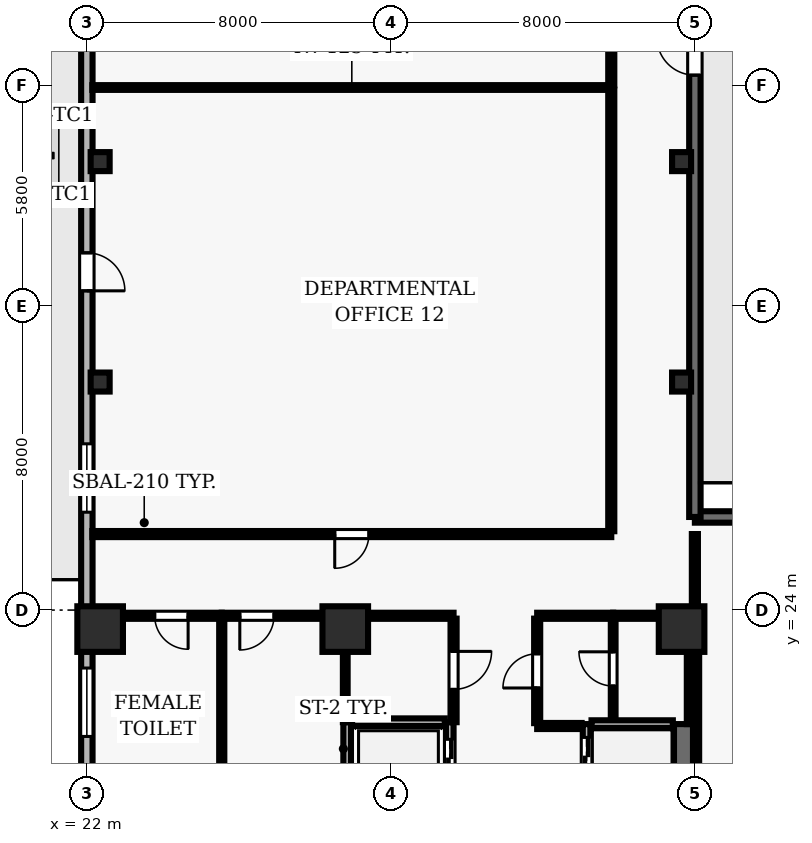
"""IFC4 building model, lengths in metres.
Left out: names, types, materials, properties, quantities, classifications, styles, units other than length and angle.
Written with IfcOpenShell. Run it as: python <this file> out.ifc"""

import sys

from ifc_helpers import new_model, si_unit, direction, frame, frame_2d, origin, origin_2d, place, context, subcontext, project, spatial, rectangle, hollow_rectangle, extrude, element, fill, save


model = new_model("IFC4")
c1 = context("Model", 3, precision=1e-05, world=origin(), true_north=direction((0.0, 1.0)))
c2 = subcontext(c1, "Body", "Model", "MODEL_VIEW")
j1 = project(units=[si_unit("LENGTHUNIT", "METRE"), si_unit("PLANEANGLEUNIT", "RADIAN")], contexts=[c1])
p1 = place(None, origin())
s1 = spatial("IfcSite", under=j1, at=p1, CompositionType="ELEMENT")
p2 = place(p1, origin())
s2 = spatial("IfcBuilding", under=s1, at=p2, CompositionType="ELEMENT")
p3 = place(p2, frame((0.0, 0.0, 138.5)))
s3 = spatial("IfcBuildingStorey", under=s2, at=p3, CompositionType="ELEMENT", Elevation=138.5)
for number, where, z_axis, x_axis in (
    (1, (22.35, 23.5, 0.0), (0.0, 0.0, 1.0), (1.0, 0.0, 0.0)),
    (2, (28.8, 23.5, 0.0), (0.0, 0.0, 1.0), (1.0, 0.0, 0.0)),
    (3, (37.65, 23.5, 0.0), (0.0, 0.0, 1.0), (1.0, 0.0, 0.0)),
):
    element("IfcColumn", number, at=place(p3, frame(where, z_axis=z_axis, x_axis=x_axis)), inside=s3, PredefinedType="COLUMN", context=c2, shape_type="SweptSolid", body=[
        extrude(rectangle(XDim=1.2, YDim=1.2, at=origin_2d()), origin(), (0.0, 0.0, 1.0), 3.9),
    ])
for number, where, z_axis, x_axis in (
    (4, (22.35, 30.0, 0.0), (0.0, 0.0, 1.0), (1.0, 0.0, 0.0)),
    (5, (37.65, 30.0, 0.0), (0.0, 0.0, 1.0), (1.0, 0.0, 0.0)),
    (6, (22.35, 35.8, 0.0), (0.0, 0.0, 1.0), (1.0, 0.0, 0.0)),
    (7, (37.65, 35.8, 0.0), (0.0, 0.0, 1.0), (1.0, 0.0, 0.0)),
):
    element("IfcColumn", number, at=place(p3, frame(where, z_axis=z_axis, x_axis=x_axis)), inside=s3, PredefinedType="COLUMN", context=c2, shape_type="SweptSolid", body=[
        extrude(hollow_rectangle(XDim=0.5, YDim=0.5, WallThickness=0.025, at=origin_2d()), origin(), (0.0, 0.0, 1.0), 3.9),
    ])
p4 = place(p3, frame((45.499, 26.45, 0.0), z_axis=(0.0, 0.0, 1.0), x_axis=(-1.0, 0.0, 0.0)))
e8 = element("IfcWall", 8, at=p4, inside=s3, PredefinedType="SOLIDWALL", context=c2, shape_type="SweptSolid", body=[
    extrude(rectangle(XDim=7.499, YDim=0.3, at=frame_2d((3.75, 0.0))), origin(), (0.0, 0.0, 1.0), 3.69),
])
p5 = place(p4, frame((2.55, 0.0, 0.9)))
e9 = element("IfcOpeningElement", 9, at=p5, cuts=e8, PredefinedType="OPENING", context=c2, shape_type="SweptSolid", body=[
    extrude(rectangle(XDim=2.4, YDim=1.6, at=frame_2d((1.2, 0.8))), frame((0.0, 0.16, 0.0), z_axis=(0.0, -1.0, 0.0), x_axis=(1.0, 0.0, 0.0)), (0.0, 0.0, 1.0), 0.32),
])
p6 = place(p3, frame((38.0, 26.45, 0.0), z_axis=(0.0, 0.0, 1.0), x_axis=(0.0, 1.0, 0.0)))
e10 = element("IfcWall", 10, at=p6, inside=s3, PredefinedType="SOLIDWALL", context=c2, shape_type="SweptSolid", body=[
    extrude(rectangle(XDim=19.65, YDim=0.3, at=frame_2d((9.825, 0.0))), origin(), (0.0, 0.0, 1.0), 3.69),
])
p7 = place(p6, frame((11.625, 0.0, 0.0)))
e11 = element("IfcOpeningElement", 11, at=p7, cuts=e10, PredefinedType="OPENING", context=c2, shape_type="SweptSolid", body=[
    extrude(rectangle(XDim=1.0, YDim=2.2, at=frame_2d((0.5, 1.1))), frame((0.0, 0.16, 0.0), z_axis=(0.0, -1.0, 0.0), x_axis=(1.0, 0.0, 0.0)), (0.0, 0.0, 1.0), 0.32),
])
p8 = place(p6, frame((15.625, 0.0, 0.9)))
e12 = element("IfcOpeningElement", 12, at=p8, cuts=e10, PredefinedType="OPENING", context=c2, shape_type="SweptSolid", body=[
    extrude(rectangle(XDim=1.5, YDim=1.8, at=frame_2d((0.75, 0.9))), frame((0.0, 0.16, 0.0), z_axis=(0.0, -1.0, 0.0), x_axis=(1.0, 0.0, 0.0)), (0.0, 0.0, 1.0), 0.32),
])
p9 = place(p3, frame((22.0, 46.1, 0.0), z_axis=(0.0, 0.0, 1.0), x_axis=(0.0, -1.0, 0.0)))
e13 = element("IfcWall", 13, at=p9, inside=s3, PredefinedType="SOLIDWALL", context=c2, shape_type="SweptSolid", body=[
    extrude(rectangle(XDim=43.6, YDim=0.3, at=frame_2d((21.8, 0.0))), origin(), (0.0, 0.0, 1.0), 3.69),
])
p10 = place(p9, frame((12.7, 0.0, 0.0)))
e14 = element("IfcOpeningElement", 14, at=p10, cuts=e13, PredefinedType="OPENING", context=c2, shape_type="SweptSolid", body=[
    extrude(rectangle(XDim=1.0, YDim=2.2, at=frame_2d((0.5, 1.1))), frame((0.0, 0.16, 0.0), z_axis=(0.0, -1.0, 0.0), x_axis=(1.0, 0.0, 0.0)), (0.0, 0.0, 1.0), 0.32),
])
p11 = place(p9, frame((1.825, 0.0, 0.9)))
e15 = element("IfcOpeningElement", 15, at=p11, cuts=e13, PredefinedType="OPENING", context=c2, shape_type="SweptSolid", body=[
    extrude(rectangle(XDim=1.8, YDim=2.2, at=frame_2d((0.9, 1.1))), frame((0.0, 0.16, 0.0), z_axis=(0.0, -1.0, 0.0), x_axis=(1.0, 0.0, 0.0)), (0.0, 0.0, 1.0), 0.32),
])
p12 = place(p9, frame((17.725, 0.0, 0.9)))
e16 = element("IfcOpeningElement", 16, at=p12, cuts=e13, PredefinedType="OPENING", context=c2, shape_type="SweptSolid", body=[
    extrude(rectangle(XDim=1.8, YDim=2.2, at=frame_2d((0.9, 1.1))), frame((0.0, 0.16, 0.0), z_axis=(0.0, -1.0, 0.0), x_axis=(1.0, 0.0, 0.0)), (0.0, 0.0, 1.0), 0.32),
])
p13 = place(p9, frame((23.625, 0.0, 0.9)))
e17 = element("IfcOpeningElement", 17, at=p13, cuts=e13, PredefinedType="OPENING", context=c2, shape_type="SweptSolid", body=[
    extrude(rectangle(XDim=1.8, YDim=2.2, at=frame_2d((0.9, 1.1))), frame((0.0, 0.16, 0.0), z_axis=(0.0, -1.0, 0.0), x_axis=(1.0, 0.0, 0.0)), (0.0, 0.0, 1.0), 0.32),
])
p14 = place(p9, frame((28.625, 0.0, 0.9)))
e18 = element("IfcOpeningElement", 18, at=p14, cuts=e13, PredefinedType="OPENING", context=c2, shape_type="SweptSolid", body=[
    extrude(rectangle(XDim=1.8, YDim=2.2, at=frame_2d((0.9, 1.1))), frame((0.0, 0.16, 0.0), z_axis=(0.0, -1.0, 0.0), x_axis=(1.0, 0.0, 0.0)), (0.0, 0.0, 1.0), 0.32),
])
p15 = place(p9, frame((34.525, 0.0, 0.9)))
e19 = element("IfcOpeningElement", 19, at=p15, cuts=e13, PredefinedType="OPENING", context=c2, shape_type="SweptSolid", body=[
    extrude(rectangle(XDim=1.8, YDim=2.2, at=frame_2d((0.9, 1.1))), frame((0.0, 0.16, 0.0), z_axis=(0.0, -1.0, 0.0), x_axis=(1.0, 0.0, 0.0)), (0.0, 0.0, 1.0), 0.32),
])
p16 = place(p3, frame((35.15, 21.0, 0.0), z_axis=(0.0, 0.0, 1.0), x_axis=(0.0, -1.0, 0.0)))
e20 = element("IfcWall", 20, at=p16, inside=s3, PredefinedType="SOLIDWALL", context=c2, shape_type="SweptSolid", body=[
    extrude(rectangle(XDim=1.7, YDim=0.2, at=frame_2d((0.85, 0.0))), origin(), (0.0, 0.0, 1.0), 3.69),
])
p17 = place(p16, frame((0.35, 0.0, 0.0)))
e21 = element("IfcOpeningElement", 21, at=p17, cuts=e20, PredefinedType="OPENING", context=c2, shape_type="SweptSolid", body=[
    extrude(rectangle(XDim=1.0, YDim=2.1, at=frame_2d((0.5, 1.05))), frame((0.0, 0.11, 0.0), z_axis=(0.0, -1.0, 0.0), x_axis=(1.0, 0.0, 0.0)), (0.0, 0.0, 1.0), 0.22),
])
p18 = place(p3, frame((37.7, 19.3, 0.0), z_axis=(0.0, 0.0, 1.0), x_axis=(0.0, 1.0, 0.0)))
e22 = element("IfcWall", 22, at=p18, inside=s3, PredefinedType="SHEAR", context=c2, shape_type="SweptSolid", body=[
    extrude(rectangle(XDim=1.7, YDim=0.5, at=frame_2d((0.85, 0.0))), origin(), (0.0, 0.0, 1.0), 3.69),
])
p19 = place(p3, frame((37.42, 21.0, 0.0), z_axis=(0.0, 0.0, 1.0), x_axis=(-1.0, 0.0, 0.0)))
e23 = element("IfcWall", 23, at=p19, inside=s3, PredefinedType="SOLIDWALL", context=c2, shape_type="SweptSolid", body=[
    extrude(rectangle(XDim=2.14, YDim=0.2, at=frame_2d((1.07, 0.0))), origin(), (0.0, 0.0, 1.0), 3.69),
])
p20 = place(p3, frame((28.85, 21.05, 0.0), z_axis=(0.0, 0.0, 1.0), x_axis=(0.0, -1.0, 0.0)))
e24 = element("IfcWall", 24, at=p20, inside=s3, PredefinedType="SOLIDWALL", context=c2, shape_type="SweptSolid", body=[
    extrude(rectangle(XDim=1.9, YDim=0.2, at=frame_2d((0.95, 0.0))), origin(), (0.0, 0.0, 1.0), 3.69),
])
p21 = place(p3, frame((31.55, 19.15, 0.0), z_axis=(0.0, 0.0, 1.0), x_axis=(0.0, 1.0, 0.0)))
e25 = element("IfcWall", 25, at=p21, inside=s3, PredefinedType="SOLIDWALL", context=c2, shape_type="SweptSolid", body=[
    extrude(rectangle(XDim=1.9, YDim=0.2, at=frame_2d((0.95, 0.0))), origin(), (0.0, 0.0, 1.0), 3.69),
])
p22 = place(p21, frame((0.45, 0.0, 0.0)))
e26 = element("IfcOpeningElement", 26, at=p22, cuts=e25, PredefinedType="OPENING", context=c2, shape_type="SweptSolid", body=[
    extrude(rectangle(XDim=1.0, YDim=2.1, at=frame_2d((0.5, 1.05))), frame((0.0, 0.11, 0.0), z_axis=(0.0, -1.0, 0.0), x_axis=(1.0, 0.0, 0.0)), (0.0, 0.0, 1.0), 0.22),
])
p23 = place(p3, frame((31.42, 21.05, 0.0), z_axis=(0.0, 0.0, 1.0), x_axis=(-1.0, 0.0, 0.0)))
e27 = element("IfcWall", 27, at=p23, inside=s3, PredefinedType="SOLIDWALL", context=c2, shape_type="SweptSolid", body=[
    extrude(rectangle(XDim=2.44, YDim=0.2, at=frame_2d((1.22, 0.0))), origin(), (0.0, 0.0, 1.0), 3.69),
])
p24 = place(p3, frame((25.55, 23.85, 0.0), z_axis=(0.0, 0.0, 1.0), x_axis=(-1.0, 0.0, 0.0)))
e28 = element("IfcWall", 28, at=p24, inside=s3, PredefinedType="PARTITIONING", context=c2, shape_type="SweptSolid", body=[
    extrude(rectangle(XDim=3.35, YDim=0.16, at=frame_2d((1.675, 0.0))), origin(), (0.0, 0.0, 1.0), 3.073),
])
p25 = place(p24, frame((0.885, 0.0, 0.0)))
e29 = element("IfcOpeningElement", 29, at=p25, cuts=e28, PredefinedType="OPENING", context=c2, shape_type="SweptSolid", body=[
    extrude(rectangle(XDim=0.88, YDim=2.1, at=frame_2d((0.44, 1.05))), frame((0.0, 0.09, 0.0), z_axis=(0.0, -1.0, 0.0), x_axis=(1.0, 0.0, 0.0)), (0.0, 0.0, 1.0), 0.18),
])
p26 = place(p3, frame((28.8, 23.85, 0.0), z_axis=(0.0, 0.0, 1.0), x_axis=(-1.0, 0.0, 0.0)))
e30 = element("IfcWall", 30, at=p26, inside=s3, PredefinedType="PARTITIONING", context=c2, shape_type="SweptSolid", body=[
    extrude(rectangle(XDim=3.25, YDim=0.16, at=frame_2d((1.625, 0.0))), origin(), (0.0, 0.0, 1.0), 3.073),
])
p27 = place(p26, frame((1.875, 0.0, 0.0)))
e31 = element("IfcOpeningElement", 31, at=p27, cuts=e30, PredefinedType="OPENING", context=c2, shape_type="SweptSolid", body=[
    extrude(rectangle(XDim=0.9, YDim=2.1, at=frame_2d((0.45, 1.05))), frame((0.0, 0.09, 0.0), z_axis=(0.0, -1.0, 0.0), x_axis=(1.0, 0.0, 0.0)), (0.0, 0.0, 1.0), 0.18),
])
p28 = place(p3, frame((31.65, 23.85, 0.0), z_axis=(0.0, 0.0, 1.0), x_axis=(-1.0, 0.0, 0.0)))
e32 = element("IfcWall", 32, at=p28, inside=s3, PredefinedType="PARTITIONING", context=c2, shape_type="SweptSolid", body=[
    extrude(rectangle(XDim=2.85, YDim=0.16, at=frame_2d((1.425, 0.0))), origin(), (0.0, 0.0, 1.0), 3.073),
])
p29 = place(p3, frame((35.02, 20.95, 0.0), z_axis=(0.0, 0.0, 1.0), x_axis=(-1.0, 0.0, 0.0)))
e33 = element("IfcWall", 33, at=p29, inside=s3, PredefinedType="PARTITIONING", context=c2, shape_type="SweptSolid", body=[
    extrude(rectangle(XDim=1.17, YDim=0.16, at=frame_2d((0.585, 0.0))), origin(), (0.0, 0.0, 1.0), 3.69),
])
p30 = place(p3, frame((35.8, 26.0, 0.0), z_axis=(0.0, 0.0, 1.0), x_axis=(-1.0, 0.0, 0.0)))
e34 = element("IfcWall", 34, at=p30, inside=s3, PredefinedType="PARTITIONING", context=c2, shape_type="SweptSolid", body=[
    extrude(rectangle(XDim=13.655, YDim=0.16, at=frame_2d((6.828, 0.0))), origin(), (0.0, 0.0, 1.0), 3.69),
])
p31 = place(p30, frame((6.377, 0.0, 0.0)))
e35 = element("IfcOpeningElement", 35, at=p31, cuts=e34, PredefinedType="OPENING", context=c2, shape_type="SweptSolid", body=[
    extrude(rectangle(XDim=0.9, YDim=2.1, at=frame_2d((0.45, 1.05))), frame((0.0, 0.09, 0.0), z_axis=(0.0, -1.0, 0.0), x_axis=(1.0, 0.0, 0.0)), (0.0, 0.0, 1.0), 0.18),
])
p32 = place(p3, frame((35.8, 37.75, 0.0), z_axis=(0.0, 0.0, 1.0), x_axis=(-1.0, 0.0, 0.0)))
e36 = element("IfcWall", 36, at=p32, inside=s3, PredefinedType="PARTITIONING", context=c2, shape_type="SweptSolid", body=[
    extrude(rectangle(XDim=13.655, YDim=0.125, at=frame_2d((6.828, 0.0))), origin(), (0.0, 0.0, 1.0), 3.69),
])
for number, where, z_axis, x_axis in (
    (37, (35.85, 23.85, 0.0), (0.0, 0.0, 1.0), (-1.0, 0.0, 0.0)),
    (38, (37.85, 23.85, 0.0), (0.0, 0.0, 1.0), (-1.0, 0.0, 0.0)),
):
    element("IfcWall", number, at=place(p3, frame(where, z_axis=z_axis, x_axis=x_axis)), inside=s3, PredefinedType="PARTITIONING", context=c2, shape_type="SweptSolid", body=[
        extrude(rectangle(XDim=2.0, YDim=0.16, at=frame_2d((1.0, 0.0))), origin(), (0.0, 0.0, 1.0), 3.073),
    ])
p33 = place(p3, frame((25.55, 19.16, 0.0), z_axis=(0.0, 0.0, 1.0), x_axis=(0.0, 1.0, 0.0)))
e39 = element("IfcWall", 39, at=p33, inside=s3, PredefinedType="PARTITIONING", context=c2, shape_type="SweptSolid", body=[
    extrude(rectangle(XDim=4.615, YDim=0.135, at=frame_2d((2.308, 0.0))), origin(), (0.0, 0.0, 1.0), 3.69),
])
p34 = place(p3, frame((28.8, 23.775, 0.0), z_axis=(0.0, 0.0, 1.0), x_axis=(0.0, -1.0, 0.0)))
e40 = element("IfcWall", 40, at=p34, inside=s3, PredefinedType="PARTITIONING", context=c2, shape_type="SweptSolid", body=[
    extrude(rectangle(XDim=2.725, YDim=0.125, at=frame_2d((1.362, 0.0))), origin(), (0.0, 0.0, 1.0), 3.69),
])
p35 = place(p3, frame((31.65, 23.775, 0.0), z_axis=(0.0, 0.0, 1.0), x_axis=(0.0, -1.0, 0.0)))
e41 = element("IfcWall", 41, at=p35, inside=s3, PredefinedType="PARTITIONING", context=c2, shape_type="SweptSolid", body=[
    extrude(rectangle(XDim=2.725, YDim=0.16, at=frame_2d((1.362, 0.0))), origin(), (0.0, 0.0, 1.0), 3.69),
])
p36 = place(p35, frame((0.862, 0.0, 0.0)))
e42 = element("IfcOpeningElement", 42, at=p36, cuts=e41, PredefinedType="OPENING", context=c2, shape_type="SweptSolid", body=[
    extrude(rectangle(XDim=1.0, YDim=2.1, at=frame_2d((0.5, 1.05))), frame((0.0, 0.09, 0.0), z_axis=(0.0, -1.0, 0.0), x_axis=(1.0, 0.0, 0.0)), (0.0, 0.0, 1.0), 0.18),
])
p37 = place(p3, frame((33.85, 21.025, 0.0), z_axis=(0.0, 0.0, 1.0), x_axis=(0.0, 1.0, 0.0)))
e43 = element("IfcWall", 43, at=p37, inside=s3, PredefinedType="PARTITIONING", context=c2, shape_type="SweptSolid", body=[
    extrude(rectangle(XDim=2.75, YDim=0.16, at=frame_2d((1.375, 0.0))), origin(), (0.0, 0.0, 1.0), 3.69),
])
p38 = place(p37, frame((0.925, 0.0, 0.0)))
e44 = element("IfcOpeningElement", 44, at=p38, cuts=e43, PredefinedType="OPENING", context=c2, shape_type="SweptSolid", body=[
    extrude(rectangle(XDim=0.9, YDim=2.1, at=frame_2d((0.45, 1.05))), frame((0.0, 0.09, 0.0), z_axis=(0.0, -1.0, 0.0), x_axis=(1.0, 0.0, 0.0)), (0.0, 0.0, 1.0), 0.18),
])
p39 = place(p3, frame((35.8, 37.693, 0.0), z_axis=(0.0, 0.0, 1.0), x_axis=(0.0, -1.0, 0.0)))
e45 = element("IfcWall", 45, at=p39, inside=s3, PredefinedType="PARTITIONING", context=c2, shape_type="SweptSolid", body=[
    extrude(rectangle(XDim=11.618, YDim=0.16, at=frame_2d((5.809, 0.0))), origin(), (0.0, 0.0, 1.0), 3.69),
])
p40 = place(p3, frame((35.8, 48.095, 0.0), z_axis=(0.0, 0.0, 1.0), x_axis=(0.0, -1.0, 0.0)))
e46 = element("IfcWall", 46, at=p40, inside=s3, PredefinedType="PARTITIONING", context=c2, shape_type="SweptSolid", body=[
    extrude(rectangle(XDim=10.288, YDim=0.16, at=frame_2d((5.144, 0.0))), origin(), (0.0, 0.0, 1.0), 3.69),
])
p41 = place(p40, frame((4.644, 0.0, 0.0)))
e47 = element("IfcOpeningElement", 47, at=p41, cuts=e46, PredefinedType="OPENING", context=c2, shape_type="SweptSolid", body=[
    extrude(rectangle(XDim=1.0, YDim=2.1, at=frame_2d((0.5, 1.05))), frame((0.0, 0.09, 0.0), z_axis=(0.0, -1.0, 0.0), x_axis=(1.0, 0.0, 0.0)), (0.0, 0.0, 1.0), 0.18),
])
p42 = place(p3, frame((35.85, 21.13, 0.0), z_axis=(0.0, 0.0, 1.0), x_axis=(0.0, 1.0, 0.0)))
e48 = element("IfcWall", 48, at=p42, inside=s3, PredefinedType="PARTITIONING", context=c2, shape_type="SweptSolid", body=[
    extrude(rectangle(XDim=2.645, YDim=0.125, at=frame_2d((1.323, 0.0))), origin(), (0.0, 0.0, 1.0), 3.69),
])
p43 = place(p42, frame((0.872, 0.0, 0.0)))
e49 = element("IfcOpeningElement", 49, at=p43, cuts=e48, PredefinedType="OPENING", context=c2, shape_type="SweptSolid", body=[
    extrude(rectangle(XDim=0.9, YDim=2.1, at=frame_2d((0.45, 1.05))), frame((0.0, 0.073, 0.0), z_axis=(0.0, -1.0, 0.0), x_axis=(1.0, 0.0, 0.0)), (0.0, 0.0, 1.0), 0.145),
])
p44 = place(p3, frame((37.85, 21.0, 0.0), z_axis=(0.0, 0.0, 1.0), x_axis=(0.0, 1.0, 0.0)))
e50 = element("IfcWall", 50, at=p44, inside=s3, PredefinedType="PARTITIONING", context=c2, shape_type="SweptSolid", body=[
    extrude(rectangle(XDim=2.775, YDim=0.125, at=frame_2d((1.387, 0.0))), origin(), (0.0, 0.0, 1.0), 3.073),
])
p45 = place(p3, frame((38.0, 23.85, 0.0), z_axis=(0.0, 0.0, 1.0), x_axis=(0.0, 1.0, 0.0)))
e51 = element("IfcWall", 51, at=p45, inside=s3, PredefinedType="PARTITIONING", context=c2, shape_type="SweptSolid", body=[
    extrude(rectangle(XDim=2.15, YDim=0.16, at=frame_2d((1.075, 0.0))), origin(), (0.0, 0.0, 1.0), 3.073),
])
p46 = place(p3, frame((38.05, 23.85, 0.0), z_axis=(0.0, 0.0, 1.0), x_axis=(0.0, -1.0, 0.0)))
e52 = element("IfcWall", 52, at=p46, inside=s3, PredefinedType="PARTITIONING", context=c2, shape_type="SweptSolid", body=[
    extrude(rectangle(XDim=7.775, YDim=0.125, at=frame_2d((3.888, 0.0))), origin(), (0.0, 0.0, 1.0), 3.073),
])
p47 = place(p7, origin())
e53 = element("IfcDoor", 53, at=p47, inside=s3, OperationType="SINGLE_SWING_RIGHT", PredefinedType="DOOR", context=c2, shape_type="SweptSolid", body=[
    extrude(rectangle(XDim=1.0, YDim=2.2, at=frame_2d((0.5, 1.1))), frame((0.0, 0.025, 0.0), z_axis=(0.0, -1.0, 0.0), x_axis=(1.0, 0.0, 0.0)), (0.0, 0.0, 1.0), 0.05),
])
fill(e11, e53)
p48 = place(p10, origin())
e54 = element("IfcDoor", 54, at=p48, inside=s3, OperationType="SINGLE_SWING_RIGHT", PredefinedType="DOOR", context=c2, shape_type="SweptSolid", body=[
    extrude(rectangle(XDim=1.0, YDim=2.2, at=frame_2d((0.5, 1.1))), frame((0.0, 0.025, 0.0), z_axis=(0.0, -1.0, 0.0), x_axis=(1.0, 0.0, 0.0)), (0.0, 0.0, 1.0), 0.05),
])
fill(e14, e54)
p49 = place(p12, origin())
e55 = element("IfcWindow", 55, at=p49, inside=s3, PartitioningType="SINGLE_PANEL", PredefinedType="WINDOW", context=c2, shape_type="SweptSolid", body=[
    extrude(rectangle(XDim=1.8, YDim=2.2, at=frame_2d((0.9, 1.1))), frame((0.0, 0.03, 0.0), z_axis=(0.0, -1.0, 0.0), x_axis=(1.0, 0.0, 0.0)), (0.0, 0.0, 1.0), 0.06),
])
fill(e16, e55)
p50 = place(p13, origin())
e56 = element("IfcWindow", 56, at=p50, inside=s3, PartitioningType="SINGLE_PANEL", PredefinedType="WINDOW", context=c2, shape_type="SweptSolid", body=[
    extrude(rectangle(XDim=1.8, YDim=2.2, at=frame_2d((0.9, 1.1))), frame((0.0, 0.03, 0.0), z_axis=(0.0, -1.0, 0.0), x_axis=(1.0, 0.0, 0.0)), (0.0, 0.0, 1.0), 0.06),
])
fill(e17, e56)
p51 = place(p17, origin())
e57 = element("IfcDoor", 57, at=p51, inside=s3, OperationType="DOUBLE_DOOR_SLIDING", PredefinedType="DOOR", context=c2, shape_type="SweptSolid", body=[
    extrude(rectangle(XDim=1.0, YDim=2.1, at=frame_2d((0.5, 1.05))), frame((0.0, 0.025, 0.0), z_axis=(0.0, -1.0, 0.0), x_axis=(1.0, 0.0, 0.0)), (0.0, 0.0, 1.0), 0.05),
])
fill(e21, e57)
p52 = place(p22, origin())
e58 = element("IfcDoor", 58, at=p52, inside=s3, OperationType="DOUBLE_DOOR_SLIDING", PredefinedType="DOOR", context=c2, shape_type="SweptSolid", body=[
    extrude(rectangle(XDim=1.0, YDim=2.1, at=frame_2d((0.5, 1.05))), frame((0.0, 0.025, 0.0), z_axis=(0.0, -1.0, 0.0), x_axis=(1.0, 0.0, 0.0)), (0.0, 0.0, 1.0), 0.05),
])
fill(e26, e58)
p53 = place(p38, origin())
e59 = element("IfcDoor", 59, at=p53, inside=s3, OperationType="SINGLE_SWING_LEFT", PredefinedType="DOOR", context=c2, shape_type="SweptSolid", body=[
    extrude(rectangle(XDim=0.9, YDim=2.1, at=frame_2d((0.45, 1.05))), frame((0.0, 0.025, 0.0), z_axis=(0.0, -1.0, 0.0), x_axis=(1.0, 0.0, 0.0)), (0.0, 0.0, 1.0), 0.05),
])
fill(e44, e59)
p54 = place(p43, origin())
e60 = element("IfcDoor", 60, at=p54, inside=s3, OperationType="SINGLE_SWING_RIGHT", PredefinedType="DOOR", context=c2, shape_type="SweptSolid", body=[
    extrude(rectangle(XDim=0.9, YDim=2.1, at=frame_2d((0.45, 1.05))), frame((0.0, 0.025, 0.0), z_axis=(0.0, -1.0, 0.0), x_axis=(1.0, 0.0, 0.0)), (0.0, 0.0, 1.0), 0.05),
])
fill(e49, e60)
p55 = place(p36, origin())
e61 = element("IfcDoor", 61, at=p55, inside=s3, OperationType="SINGLE_SWING_LEFT", PredefinedType="DOOR", context=c2, shape_type="SweptSolid", body=[
    extrude(rectangle(XDim=1.0, YDim=2.1, at=frame_2d((0.5, 1.05))), frame((0.0, 0.025, 0.0), z_axis=(0.0, -1.0, 0.0), x_axis=(1.0, 0.0, 0.0)), (0.0, 0.0, 1.0), 0.05),
])
fill(e42, e61)
p56 = place(p25, origin())
e62 = element("IfcDoor", 62, at=p56, inside=s3, OperationType="SINGLE_SWING_LEFT", PredefinedType="DOOR", context=c2, shape_type="SweptSolid", body=[
    extrude(rectangle(XDim=0.88, YDim=2.1, at=frame_2d((0.44, 1.05))), frame((0.0, 0.025, 0.0), z_axis=(0.0, -1.0, 0.0), x_axis=(1.0, 0.0, 0.0)), (0.0, 0.0, 1.0), 0.05),
])
fill(e29, e62)
p57 = place(p27, origin())
e63 = element("IfcDoor", 63, at=p57, inside=s3, OperationType="SINGLE_SWING_RIGHT", PredefinedType="DOOR", context=c2, shape_type="SweptSolid", body=[
    extrude(rectangle(XDim=0.9, YDim=2.1, at=frame_2d((0.45, 1.05))), frame((0.0, 0.025, 0.0), z_axis=(0.0, -1.0, 0.0), x_axis=(1.0, 0.0, 0.0)), (0.0, 0.0, 1.0), 0.05),
])
fill(e31, e63)
p58 = place(p31, origin())
e64 = element("IfcDoor", 64, at=p58, inside=s3, OperationType="SINGLE_SWING_RIGHT", PredefinedType="DOOR", context=c2, shape_type="SweptSolid", body=[
    extrude(rectangle(XDim=0.9, YDim=2.1, at=frame_2d((0.45, 1.05))), frame((0.0, 0.025, 0.0), z_axis=(0.0, -1.0, 0.0), x_axis=(1.0, 0.0, 0.0)), (0.0, 0.0, 1.0), 0.05),
])
fill(e35, e64)
save(model, sys.argv[1])
